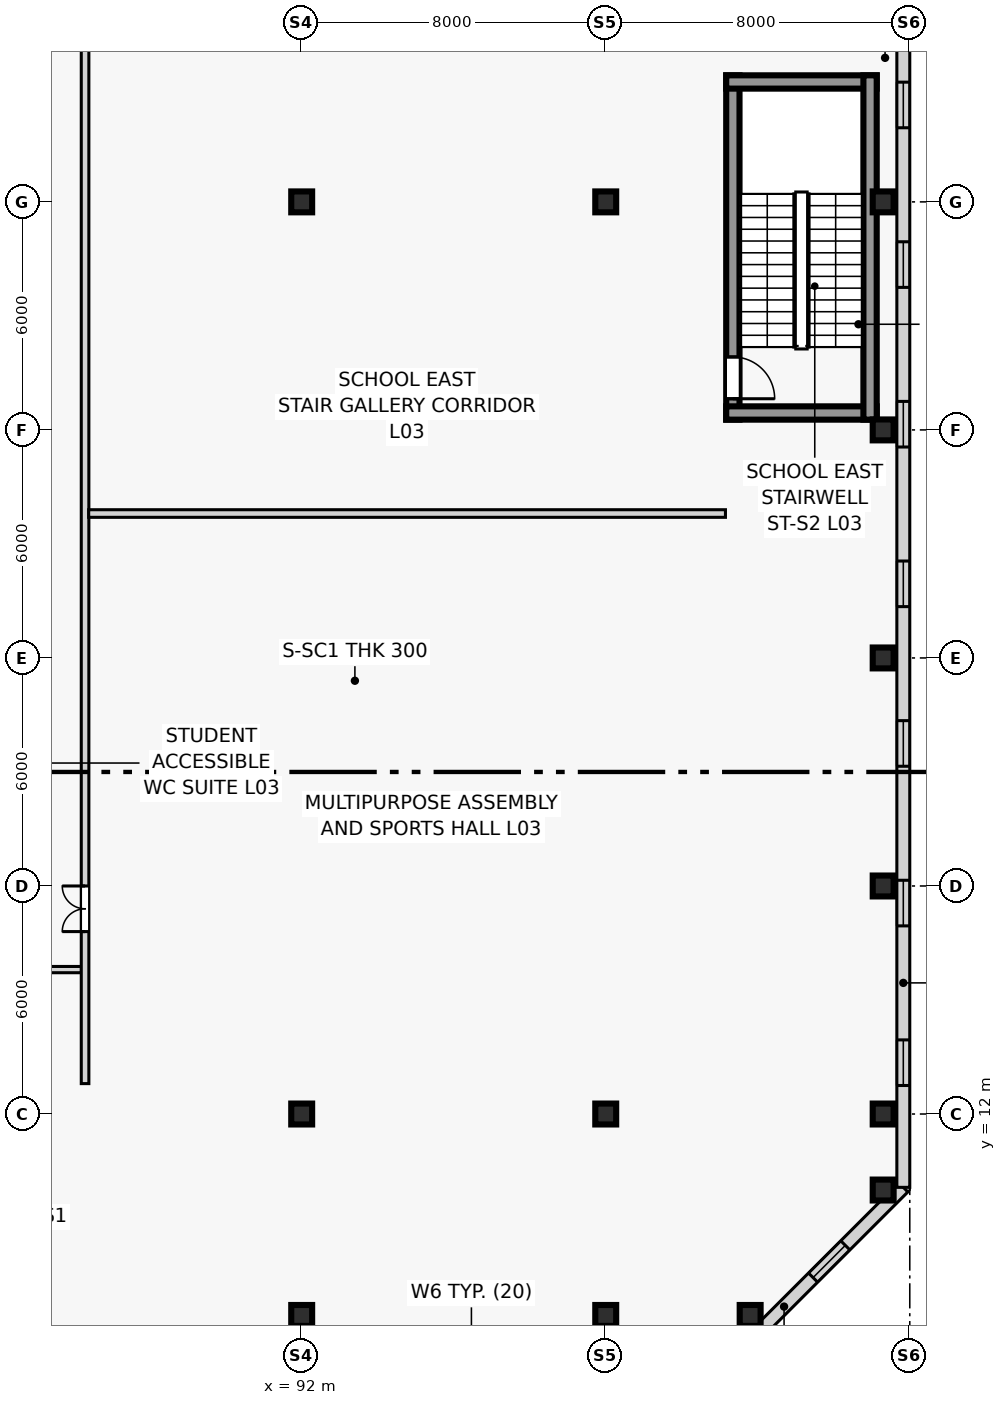
"""IFC4 building model, lengths in metres.
Left out: names, types, materials, properties, quantities, classifications, styles, units other than length and angle.
Written with IfcOpenShell. Run it as: python <this file> out.ifc"""

import sys

from ifc_helpers import new_model, si_unit, direction, frame, frame_2d, origin, origin_2d, place, context, subcontext, project, spatial, rectangle, extrude, source, transform, mapped, element, fill, save


model = new_model("IFC4")
c1 = context("Model", 3, precision=1e-05, world=origin(), true_north=direction((0.0, 1.0)))
c2 = subcontext(c1, "Body", "Model", "MODEL_VIEW")
j1 = project(units=[si_unit("LENGTHUNIT", "METRE"), si_unit("PLANEANGLEUNIT", "RADIAN")], contexts=[c1])
p1 = place(None, origin())
s1 = spatial("IfcSite", under=j1, at=p1, CompositionType="ELEMENT")
p2 = place(p1, origin())
s2 = spatial("IfcBuilding", under=s1, at=p2, CompositionType="ELEMENT")
p3 = place(p2, frame((0.0, 0.0, 13.5)))
s3 = spatial("IfcBuildingStorey", under=s2, at=p3, CompositionType="ELEMENT", Elevation=13.5)
p4 = place(p3, frame((103.345, 30.27, 0.0), z_axis=(0.0, 0.0, 1.0), x_axis=(0.0, 1.0, 0.0)))
e1 = element("IfcWall", 1, at=p4, inside=s3, PredefinedType="SHEAR", context=c2, shape_type="SweptSolid", body=[
    extrude(rectangle(XDim=9.06, YDim=0.35, at=frame_2d((4.53, 0.0))), origin(), (0.0, 0.0, 1.0), 4.5),
])
p5 = place(p4, frame((0.55, 0.0, 0.0)))
e2 = element("IfcOpeningElement", 2, at=p5, cuts=e1, PredefinedType="OPENING", context=c2, shape_type="SweptSolid", body=[
    extrude(rectangle(XDim=1.1, YDim=2.2, at=frame_2d((0.55, 1.1))), frame((0.0, 0.185, 0.0), z_axis=(0.0, -1.0, 0.0), x_axis=(1.0, 0.0, 0.0)), (0.0, 0.0, 1.0), 0.37),
])
for number, where, z_axis, x_axis in (
    (3, (103.17, 30.445, 0.0), (0.0, 0.0, 1.0), (1.0, 0.0, 0.0)),
    (4, (103.17, 39.155, 0.0), (0.0, 0.0, 1.0), (1.0, 0.0, 0.0)),
):
    element("IfcWall", number, at=place(p3, frame(where, z_axis=z_axis, x_axis=x_axis)), inside=s3, PredefinedType="SHEAR", context=c2, shape_type="SweptSolid", body=[
        extrude(rectangle(XDim=3.96, YDim=0.35, at=frame_2d((1.98, 0.0))), origin(), (0.0, 0.0, 1.0), 4.5),
    ])
p6 = place(p3, frame((106.955, 30.27, 0.0), z_axis=(0.0, 0.0, 1.0), x_axis=(0.0, 1.0, 0.0)))
e5 = element("IfcWall", 5, at=p6, inside=s3, PredefinedType="SHEAR", context=c2, shape_type="SweptSolid", body=[
    extrude(rectangle(XDim=9.06, YDim=0.35, at=frame_2d((4.53, 0.0))), origin(), (0.0, 0.0, 1.0), 4.5),
])
m1 = source(origin(), c2, "Body", "SweptSolid", [
    extrude(rectangle(XDim=0.55, YDim=0.55, at=origin_2d()), origin(), (0.0, 0.0, 1.0), 4.5),
])
for number, where, z_axis, x_axis in (
    (6, (92.0, 6.7, 0.0), (0.0, 0.0, 1.0), (1.0, 0.0, 0.0)),
    (7, (92.0, 12.0, 0.0), (0.0, 0.0, 1.0), (1.0, 0.0, 0.0)),
    (8, (92.0, 36.0, 0.0), (0.0, 0.0, 1.0), (1.0, 0.0, 0.0)),
    (9, (100.0, 6.7, 0.0), (0.0, 0.0, 1.0), (1.0, 0.0, 0.0)),
    (10, (100.0, 12.0, 0.0), (0.0, 0.0, 1.0), (1.0, 0.0, 0.0)),
    (11, (100.0, 36.0, 0.0), (0.0, 0.0, 1.0), (1.0, 0.0, 0.0)),
    (12, (107.3, 12.0, 0.0), (0.0, 0.0, 1.0), (1.0, 0.0, 0.0)),
    (13, (107.3, 18.0, 0.0), (0.0, 0.0, 1.0), (1.0, 0.0, 0.0)),
    (14, (107.3, 24.0, 0.0), (0.0, 0.0, 1.0), (1.0, 0.0, 0.0)),
    (15, (107.3, 30.0, 0.0), (0.0, 0.0, 1.0), (1.0, 0.0, 0.0)),
    (16, (107.3, 36.0, 0.0), (0.0, 0.0, 1.0), (1.0, 0.0, 0.0)),
    (17, (103.8, 6.7, 0.0), (0.0, 0.0, 1.0), (1.0, 0.0, 0.0)),
    (18, (107.3, 10.0, 0.0), (0.0, 0.0, 1.0), (1.0, 0.0, 0.0)),
):
    element("IfcColumn", number, at=place(p3, frame(where, z_axis=z_axis, x_axis=x_axis)), inside=s3, PredefinedType="COLUMN", context=c2, shape_type="MappedRepresentation", body=[
        mapped(m1, transform((0.0, 0.0, 0.0), scale=1.0)),
    ])
p7 = place(p3, frame((103.93, 6.17, 0.0), z_axis=(0.0, 0.0, 1.0), x_axis=(0.707106781187, 0.707106781187, 0.0)))
e19 = element("IfcWall", 19, at=p7, inside=s3, PredefinedType="SOLIDWALL", context=c2, shape_type="SweptSolid", body=[
    extrude(rectangle(XDim=5.516, YDim=0.34, at=frame_2d((2.758, 0.0))), origin(), (0.0, 0.0, 1.0), 4.2),
])
p8 = place(p7, frame((2.158, 0.0, 0.95)))
e20 = element("IfcOpeningElement", 20, at=p8, cuts=e19, PredefinedType="OPENING", context=c2, shape_type="SweptSolid", body=[
    extrude(rectangle(XDim=1.2, YDim=1.5, at=frame_2d((0.6, 0.75))), frame((0.0, 0.18, 0.0), z_axis=(0.0, -1.0, 0.0), x_axis=(1.0, 0.0, 0.0)), (0.0, 0.0, 1.0), 0.36),
])
p9 = place(p3, frame((107.83, 10.07, 0.0), z_axis=(0.0, 0.0, 1.0), x_axis=(0.0, 1.0, 0.0)))
e21 = element("IfcWall", 21, at=p9, inside=s3, PredefinedType="SOLIDWALL", context=c2, shape_type="SweptSolid", body=[
    extrude(rectangle(XDim=31.76, YDim=0.34, at=frame_2d((15.88, 0.0))), origin(), (0.0, 0.0, 1.0), 4.2),
])
p10 = place(p9, frame((2.68, 0.0, 0.95)))
e22 = element("IfcOpeningElement", 22, at=p10, cuts=e21, PredefinedType="OPENING", context=c2, shape_type="SweptSolid", body=[
    extrude(rectangle(XDim=1.2, YDim=1.5, at=frame_2d((0.6, 0.75))), frame((0.0, 0.18, 0.0), z_axis=(0.0, -1.0, 0.0), x_axis=(1.0, 0.0, 0.0)), (0.0, 0.0, 1.0), 0.36),
])
p11 = place(p9, frame((6.88, 0.0, 0.95)))
e23 = element("IfcOpeningElement", 23, at=p11, cuts=e21, PredefinedType="OPENING", context=c2, shape_type="SweptSolid", body=[
    extrude(rectangle(XDim=1.2, YDim=1.5, at=frame_2d((0.6, 0.75))), frame((0.0, 0.18, 0.0), z_axis=(0.0, -1.0, 0.0), x_axis=(1.0, 0.0, 0.0)), (0.0, 0.0, 1.0), 0.36),
])
p12 = place(p9, frame((11.08, 0.0, 0.95)))
e24 = element("IfcOpeningElement", 24, at=p12, cuts=e21, PredefinedType="OPENING", context=c2, shape_type="SweptSolid", body=[
    extrude(rectangle(XDim=1.2, YDim=1.5, at=frame_2d((0.6, 0.75))), frame((0.0, 0.18, 0.0), z_axis=(0.0, -1.0, 0.0), x_axis=(1.0, 0.0, 0.0)), (0.0, 0.0, 1.0), 0.36),
])
p13 = place(p9, frame((15.28, 0.0, 0.95)))
e25 = element("IfcOpeningElement", 25, at=p13, cuts=e21, PredefinedType="OPENING", context=c2, shape_type="SweptSolid", body=[
    extrude(rectangle(XDim=1.2, YDim=1.5, at=frame_2d((0.6, 0.75))), frame((0.0, 0.18, 0.0), z_axis=(0.0, -1.0, 0.0), x_axis=(1.0, 0.0, 0.0)), (0.0, 0.0, 1.0), 0.36),
])
p14 = place(p9, frame((19.48, 0.0, 0.95)))
e26 = element("IfcOpeningElement", 26, at=p14, cuts=e21, PredefinedType="OPENING", context=c2, shape_type="SweptSolid", body=[
    extrude(rectangle(XDim=1.2, YDim=1.5, at=frame_2d((0.6, 0.75))), frame((0.0, 0.18, 0.0), z_axis=(0.0, -1.0, 0.0), x_axis=(1.0, 0.0, 0.0)), (0.0, 0.0, 1.0), 0.36),
])
p15 = place(p9, frame((23.68, 0.0, 0.95)))
e27 = element("IfcOpeningElement", 27, at=p15, cuts=e21, PredefinedType="OPENING", context=c2, shape_type="SweptSolid", body=[
    extrude(rectangle(XDim=1.2, YDim=1.5, at=frame_2d((0.6, 0.75))), frame((0.0, 0.18, 0.0), z_axis=(0.0, -1.0, 0.0), x_axis=(1.0, 0.0, 0.0)), (0.0, 0.0, 1.0), 0.36),
])
p16 = place(p9, frame((27.88, 0.0, 0.95)))
e28 = element("IfcOpeningElement", 28, at=p16, cuts=e21, PredefinedType="OPENING", context=c2, shape_type="SweptSolid", body=[
    extrude(rectangle(XDim=1.2, YDim=1.5, at=frame_2d((0.6, 0.75))), frame((0.0, 0.18, 0.0), z_axis=(0.0, -1.0, 0.0), x_axis=(1.0, 0.0, 0.0)), (0.0, 0.0, 1.0), 0.36),
])
p17 = place(p3, frame((74.25, 15.8, 0.0), z_axis=(0.0, 0.0, 1.0), x_axis=(1.0, 0.0, 0.0)))
e29 = element("IfcWall", 29, at=p17, inside=s3, PredefinedType="PARTITIONING", context=c2, shape_type="SweptSolid", body=[
    extrude(rectangle(XDim=11.955, YDim=0.165, at=frame_2d((5.978, 0.0))), origin(), (0.0, 0.0, 1.0), 4.2),
])
p18 = place(p17, frame((1.6, 0.0, 0.0)))
e30 = element("IfcOpeningElement", 30, at=p18, cuts=e29, PredefinedType="OPENING", context=c2, shape_type="SweptSolid", body=[
    extrude(rectangle(XDim=1.0, YDim=2.15, at=frame_2d((0.5, 1.075))), frame((0.0, 0.093, 0.0), z_axis=(0.0, -1.0, 0.0), x_axis=(1.0, 0.0, 0.0)), (0.0, 0.0, 1.0), 0.185),
])
p19 = place(p17, frame((8.45, 0.0, 0.0)))
e31 = element("IfcOpeningElement", 31, at=p19, cuts=e29, PredefinedType="OPENING", context=c2, shape_type="SweptSolid", body=[
    extrude(rectangle(XDim=1.0, YDim=2.15, at=frame_2d((0.5, 1.075))), frame((0.0, 0.093, 0.0), z_axis=(0.0, -1.0, 0.0), x_axis=(1.0, 0.0, 0.0)), (0.0, 0.0, 1.0), 0.185),
])
p20 = place(p3, frame((86.3, 12.8, 0.0), z_axis=(0.0, 0.0, 1.0), x_axis=(0.0, 1.0, 0.0)))
e32 = element("IfcWall", 32, at=p20, inside=s3, PredefinedType="PARTITIONING", context=c2, shape_type="SweptSolid", body=[
    extrude(rectangle(XDim=29.015, YDim=0.2, at=frame_2d((14.507, 0.0))), origin(), (0.0, 0.0, 1.0), 4.2),
])
p21 = place(p20, frame((4.0, 0.0, 0.0)))
e33 = element("IfcOpeningElement", 33, at=p21, cuts=e32, PredefinedType="OPENING", context=c2, shape_type="SweptSolid", body=[
    extrude(rectangle(XDim=1.2, YDim=2.2, at=frame_2d((0.6, 1.1))), frame((0.0, 0.11, 0.0), z_axis=(0.0, -1.0, 0.0), x_axis=(1.0, 0.0, 0.0)), (0.0, 0.0, 1.0), 0.22),
])
p22 = place(p3, frame((86.395, 27.8, 0.0), z_axis=(0.0, 0.0, 1.0), x_axis=(1.0, 0.0, 0.0)))
e34 = element("IfcWall", 34, at=p22, inside=s3, PredefinedType="PARTITIONING", context=c2, shape_type="SweptSolid", body=[
    extrude(rectangle(XDim=16.755, YDim=0.2, at=frame_2d((8.377, 0.0))), origin(), (0.0, 0.0, 1.0), 4.2),
])
m2 = source(origin(), c2, "Body", "SweptSolid", [
    extrude(rectangle(XDim=1.2, YDim=1.5, at=frame_2d((0.6, 0.75))), frame((0.0, 0.03, 0.0), z_axis=(0.0, -1.0, 0.0), x_axis=(1.0, 0.0, 0.0)), (0.0, 0.0, 1.0), 0.06),
])
p23 = place(p8, origin())
e35 = element("IfcWindow", 35, at=p23, inside=s3, PartitioningType="SINGLE_PANEL", PredefinedType="WINDOW", context=c2, shape_type="MappedRepresentation", body=[
    mapped(m2, transform((0.0, 0.0, 0.0), scale=1.0)),
])
fill(e20, e35)
p24 = place(p10, origin())
e36 = element("IfcWindow", 36, at=p24, inside=s3, PartitioningType="SINGLE_PANEL", PredefinedType="WINDOW", context=c2, shape_type="MappedRepresentation", body=[
    mapped(m2, transform((0.0, 0.0, 0.0), scale=1.0)),
])
fill(e22, e36)
p25 = place(p11, origin())
e37 = element("IfcWindow", 37, at=p25, inside=s3, PartitioningType="SINGLE_PANEL", PredefinedType="WINDOW", context=c2, shape_type="MappedRepresentation", body=[
    mapped(m2, transform((0.0, 0.0, 0.0), scale=1.0)),
])
fill(e23, e37)
p26 = place(p12, origin())
e38 = element("IfcWindow", 38, at=p26, inside=s3, PartitioningType="SINGLE_PANEL", PredefinedType="WINDOW", context=c2, shape_type="MappedRepresentation", body=[
    mapped(m2, transform((0.0, 0.0, 0.0), scale=1.0)),
])
fill(e24, e38)
p27 = place(p13, origin())
e39 = element("IfcWindow", 39, at=p27, inside=s3, PartitioningType="SINGLE_PANEL", PredefinedType="WINDOW", context=c2, shape_type="MappedRepresentation", body=[
    mapped(m2, transform((0.0, 0.0, 0.0), scale=1.0)),
])
fill(e25, e39)
p28 = place(p14, origin())
e40 = element("IfcWindow", 40, at=p28, inside=s3, PartitioningType="SINGLE_PANEL", PredefinedType="WINDOW", context=c2, shape_type="MappedRepresentation", body=[
    mapped(m2, transform((0.0, 0.0, 0.0), scale=1.0)),
])
fill(e26, e40)
p29 = place(p15, origin())
e41 = element("IfcWindow", 41, at=p29, inside=s3, PartitioningType="SINGLE_PANEL", PredefinedType="WINDOW", context=c2, shape_type="MappedRepresentation", body=[
    mapped(m2, transform((0.0, 0.0, 0.0), scale=1.0)),
])
fill(e27, e41)
p30 = place(p16, origin())
e42 = element("IfcWindow", 42, at=p30, inside=s3, PartitioningType="SINGLE_PANEL", PredefinedType="WINDOW", context=c2, shape_type="MappedRepresentation", body=[
    mapped(m2, transform((0.0, 0.0, 0.0), scale=1.0)),
])
fill(e28, e42)
m3 = source(origin(), c2, "Body", "SweptSolid", [
    extrude(rectangle(XDim=1.1, YDim=2.2, at=frame_2d((0.55, 1.1))), frame((0.0, 0.025, 0.0), z_axis=(0.0, -1.0, 0.0), x_axis=(1.0, 0.0, 0.0)), (0.0, 0.0, 1.0), 0.05),
])
p31 = place(p5, frame((1.1, 0.0, 0.0), z_axis=(0.0, 0.0, 1.0), x_axis=(-1.0, 0.0, 0.0)))
e43 = element("IfcDoor", 43, at=p31, inside=s3, OperationType="SINGLE_SWING_RIGHT", PredefinedType="DOOR", context=c2, shape_type="MappedRepresentation", body=[
    mapped(m3, transform((0.0, 0.0, 0.0), scale=1.0)),
])
fill(e2, e43)
m4 = source(origin(), c2, "Body", "SweptSolid", [
    extrude(rectangle(XDim=1.2, YDim=2.2, at=frame_2d((0.6, 1.1))), frame((0.0, 0.025, 0.0), z_axis=(0.0, -1.0, 0.0), x_axis=(1.0, 0.0, 0.0)), (0.0, 0.0, 1.0), 0.05),
])
p32 = place(p21, origin())
e44 = element("IfcDoor", 44, at=p32, inside=s3, OperationType="DOUBLE_DOOR_SINGLE_SWING", PredefinedType="DOOR", context=c2, shape_type="MappedRepresentation", body=[
    mapped(m4, transform((0.0, 0.0, 0.0), scale=1.0)),
])
fill(e33, e44)
save(model, sys.argv[1])
